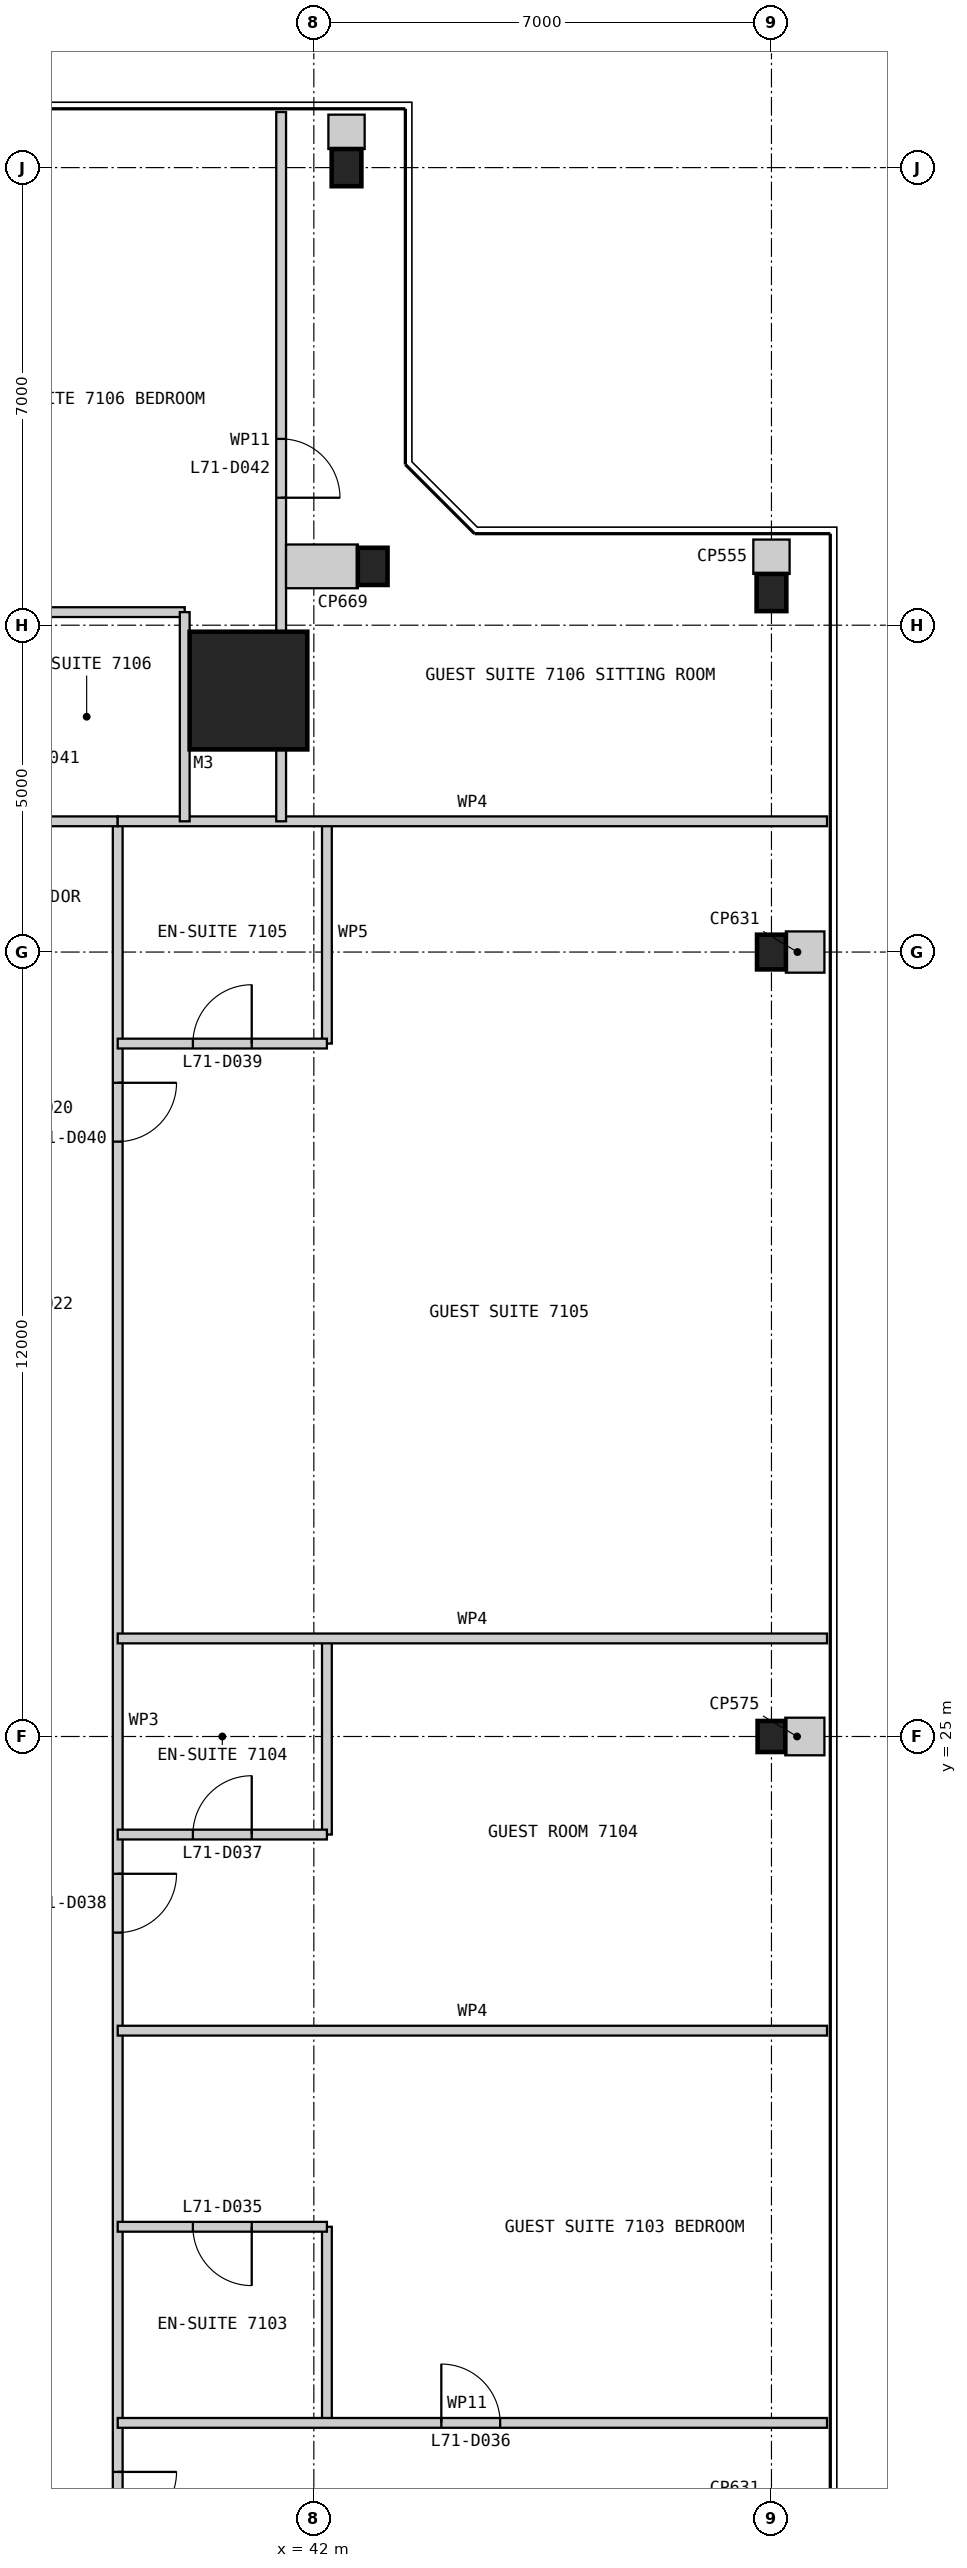
"""IFC4 building model, lengths in metres.
Left out: names, types, materials, properties, quantities, classifications, styles, units other than length and angle.
Written with IfcOpenShell. Run it as: python <this file> out.ifc"""

import sys

from ifc_helpers import new_model, si_unit, direction, frame, frame_2d, origin, origin_2d, place, context, subcontext, project, spatial, rectangle, i_section, extrude, element, fill, save


model = new_model("IFC4")
c1 = context("Model", 3, precision=1e-05, world=origin(), true_north=direction((0.0, 1.0)))
c2 = subcontext(c1, "Body", "Model", "MODEL_VIEW")
j1 = project(units=[si_unit("LENGTHUNIT", "METRE"), si_unit("PLANEANGLEUNIT", "RADIAN")], contexts=[c1])
p1 = place(None, origin())
s1 = spatial("IfcSite", under=j1, at=p1, CompositionType="ELEMENT")
p2 = place(p1, origin())
s2 = spatial("IfcBuilding", under=s1, at=p2, CompositionType="ELEMENT")
p3 = place(p2, frame((0.0, 0.0, 293.4)))
s3 = spatial("IfcBuildingStorey", under=s2, at=p3, CompositionType="ELEMENT", Elevation=293.4)
p4 = place(p3, frame((41.0, 41.0, 0.0), z_axis=(0.0, 0.0, 1.0), x_axis=(1.0, 0.0, 0.0)))
e1 = element("IfcColumn", 1, at=p4, inside=s3, PredefinedType="COLUMN", context=c2, shape_type="SweptSolid", body=[
    extrude(rectangle(XDim=1.8, YDim=1.8, at=origin_2d()), origin(), (0.0, 0.0, 1.0), 3.4),
])
p5 = place(p3, frame((49.0, 25.0, 0.0), z_axis=(0.0, 0.0, 1.0), x_axis=(1.0, 0.0, 0.0)))
e2 = element("IfcColumn", 2, at=p5, inside=s3, PredefinedType="COLUMN", context=c2, shape_type="SweptSolid", body=[
    extrude(i_section(OverallWidth=0.424, OverallDepth=0.475, WebThickness=0.048, FlangeThickness=0.077, at=origin_2d()), origin(), (0.0, 0.0, 1.0), 3.4),
])
p6 = place(p3, frame((49.0, 37.0, 0.0), z_axis=(0.0, 0.0, 1.0), x_axis=(1.0, 0.0, 0.0)))
e3 = element("IfcColumn", 3, at=p6, inside=s3, PredefinedType="COLUMN", context=c2, shape_type="SweptSolid", body=[
    extrude(i_section(OverallWidth=0.442, OverallDepth=0.531, WebThickness=0.066, FlangeThickness=0.106, at=origin_2d()), origin(), (0.0, 0.0, 1.0), 3.4),
])
for number, where, z_axis, x_axis in (
    (4, (49.0, 42.5, 0.0), (0.0, 0.0, 1.0), (1.0, 0.0, 0.0)),
    (5, (42.9, 42.9, 0.0), (0.0, 0.0, 1.0), (1.0, 0.0, 0.0)),
    (6, (42.5, 49.0, 0.0), (0.0, 0.0, 1.0), (1.0, 0.0, 0.0)),
):
    element("IfcColumn", number, at=place(p3, frame(where, z_axis=z_axis, x_axis=x_axis)), inside=s3, PredefinedType="COLUMN", context=c2, shape_type="SweptSolid", body=[
        extrude(i_section(OverallWidth=0.455, OverallDepth=0.569, WebThickness=0.078, FlangeThickness=0.125, at=origin_2d()), origin(), (0.0, 0.0, 1.0), 3.4),
    ])
p7 = place(p3, frame((39.0, 11.0, 0.0), z_axis=(0.0, 0.0, 1.0), x_axis=(0.0, 1.0, 0.0)))
e7 = element("IfcWall", 7, at=p7, inside=s3, PredefinedType="PARTITIONING", context=c2, shape_type="SweptSolid", body=[
    extrude(rectangle(XDim=28.0, YDim=0.15, at=frame_2d((14.0, 0.0))), origin(), (0.0, 0.0, 1.0), 2.794),
])
p8 = place(p7, frame((1.85, 0.0, 0.0)))
e8 = element("IfcOpeningElement", 8, at=p8, cuts=e7, PredefinedType="OPENING", context=c2, shape_type="SweptSolid", body=[
    extrude(rectangle(XDim=0.9, YDim=2.1, at=frame_2d((0.45, 1.05))), frame((0.0, 0.085, 0.0), z_axis=(0.0, -1.0, 0.0), x_axis=(1.0, 0.0, 0.0)), (0.0, 0.0, 1.0), 0.17),
])
p9 = place(p7, frame((11.0, 0.0, 0.0)))
e9 = element("IfcOpeningElement", 9, at=p9, cuts=e7, PredefinedType="OPENING", context=c2, shape_type="SweptSolid", body=[
    extrude(rectangle(XDim=0.9, YDim=2.1, at=frame_2d((0.45, 1.05))), frame((0.0, 0.085, 0.0), z_axis=(0.0, -1.0, 0.0), x_axis=(1.0, 0.0, 0.0)), (0.0, 0.0, 1.0), 0.17),
])
p10 = place(p7, frame((23.1, 0.0, 0.0)))
e10 = element("IfcOpeningElement", 10, at=p10, cuts=e7, PredefinedType="OPENING", context=c2, shape_type="SweptSolid", body=[
    extrude(rectangle(XDim=0.9, YDim=2.1, at=frame_2d((0.45, 1.05))), frame((0.0, 0.085, 0.0), z_axis=(0.0, -1.0, 0.0), x_axis=(1.0, 0.0, 0.0)), (0.0, 0.0, 1.0), 0.17),
])
p11 = place(p3, frame((42.2, 14.5, 0.0), z_axis=(0.0, 0.0, 1.0), x_axis=(0.0, 1.0, 0.0)))
e11 = element("IfcWall", 11, at=p11, inside=s3, PredefinedType="PARTITIONING", context=c2, shape_type="SweptSolid", body=[
    extrude(rectangle(XDim=3.0, YDim=0.15, at=frame_2d((1.5, 0.0))), origin(), (0.0, 0.0, 1.0), 3.2),
])
p12 = place(p3, frame((42.2, 17.5, 0.0), z_axis=(0.0, 0.0, 1.0), x_axis=(-1.0, 0.0, 0.0)))
e12 = element("IfcWall", 12, at=p12, inside=s3, PredefinedType="PARTITIONING", context=c2, shape_type="SweptSolid", body=[
    extrude(rectangle(XDim=3.2, YDim=0.15, at=frame_2d((1.6, 0.0))), origin(), (0.0, 0.0, 1.0), 3.2),
])
p13 = place(p12, frame((1.15, 0.0, 0.0)))
e13 = element("IfcOpeningElement", 13, at=p13, cuts=e12, PredefinedType="OPENING", context=c2, shape_type="SweptSolid", body=[
    extrude(rectangle(XDim=0.9, YDim=2.1, at=frame_2d((0.45, 1.05))), frame((0.0, 0.085, 0.0), z_axis=(0.0, -1.0, 0.0), x_axis=(1.0, 0.0, 0.0)), (0.0, 0.0, 1.0), 0.17),
])
p14 = place(p3, frame((49.85, 14.5, 0.0), z_axis=(0.0, 0.0, 1.0), x_axis=(-1.0, 0.0, 0.0)))
e14 = element("IfcWall", 14, at=p14, inside=s3, PredefinedType="PARTITIONING", context=c2, shape_type="SweptSolid", body=[
    extrude(rectangle(XDim=10.85, YDim=0.15, at=frame_2d((5.425, 0.0))), origin(), (0.0, 0.0, 1.0), 3.2),
])
p15 = place(p14, frame((5.0, 0.0, 0.0)))
e15 = element("IfcOpeningElement", 15, at=p15, cuts=e14, PredefinedType="OPENING", context=c2, shape_type="SweptSolid", body=[
    extrude(rectangle(XDim=0.9, YDim=2.1, at=frame_2d((0.45, 1.05))), frame((0.0, 0.085, 0.0), z_axis=(0.0, -1.0, 0.0), x_axis=(1.0, 0.0, 0.0)), (0.0, 0.0, 1.0), 0.17),
])
p16 = place(p3, frame((49.85, 20.5, 0.0), z_axis=(0.0, 0.0, 1.0), x_axis=(-1.0, 0.0, 0.0)))
e16 = element("IfcWall", 16, at=p16, inside=s3, PredefinedType="PARTITIONING", context=c2, shape_type="SweptSolid", body=[
    extrude(rectangle(XDim=10.85, YDim=0.15, at=frame_2d((5.425, 0.0))), origin(), (0.0, 0.0, 1.0), 3.2),
])
p17 = place(p3, frame((42.2, 23.5, 0.0), z_axis=(0.0, 0.0, 1.0), x_axis=(0.0, 1.0, 0.0)))
e17 = element("IfcWall", 17, at=p17, inside=s3, PredefinedType="PARTITIONING", context=c2, shape_type="SweptSolid", body=[
    extrude(rectangle(XDim=3.0, YDim=0.15, at=frame_2d((1.5, 0.0))), origin(), (0.0, 0.0, 1.0), 3.2),
])
p18 = place(p3, frame((42.2, 23.5, 0.0), z_axis=(0.0, 0.0, 1.0), x_axis=(-1.0, 0.0, 0.0)))
e18 = element("IfcWall", 18, at=p18, inside=s3, PredefinedType="PARTITIONING", context=c2, shape_type="SweptSolid", body=[
    extrude(rectangle(XDim=3.2, YDim=0.15, at=frame_2d((1.6, 0.0))), origin(), (0.0, 0.0, 1.0), 3.2),
])
p19 = place(p18, frame((1.15, 0.0, 0.0)))
e19 = element("IfcOpeningElement", 19, at=p19, cuts=e18, PredefinedType="OPENING", context=c2, shape_type="SweptSolid", body=[
    extrude(rectangle(XDim=0.9, YDim=2.1, at=frame_2d((0.45, 1.05))), frame((0.0, 0.085, 0.0), z_axis=(0.0, -1.0, 0.0), x_axis=(1.0, 0.0, 0.0)), (0.0, 0.0, 1.0), 0.17),
])
p20 = place(p3, frame((49.85, 26.5, 0.0), z_axis=(0.0, 0.0, 1.0), x_axis=(-1.0, 0.0, 0.0)))
e20 = element("IfcWall", 20, at=p20, inside=s3, PredefinedType="PARTITIONING", context=c2, shape_type="SweptSolid", body=[
    extrude(rectangle(XDim=10.85, YDim=0.15, at=frame_2d((5.425, 0.0))), origin(), (0.0, 0.0, 1.0), 3.2),
])
p21 = place(p3, frame((42.2, 35.6, 0.0), z_axis=(0.0, 0.0, 1.0), x_axis=(0.0, 1.0, 0.0)))
e21 = element("IfcWall", 21, at=p21, inside=s3, PredefinedType="PARTITIONING", context=c2, shape_type="SweptSolid", body=[
    extrude(rectangle(XDim=3.4, YDim=0.15, at=frame_2d((1.7, 0.0))), origin(), (0.0, 0.0, 1.0), 3.2),
])
p22 = place(p3, frame((42.2, 35.6, 0.0), z_axis=(0.0, 0.0, 1.0), x_axis=(-1.0, 0.0, 0.0)))
e22 = element("IfcWall", 22, at=p22, inside=s3, PredefinedType="PARTITIONING", context=c2, shape_type="SweptSolid", body=[
    extrude(rectangle(XDim=3.2, YDim=0.15, at=frame_2d((1.6, 0.0))), origin(), (0.0, 0.0, 1.0), 3.2),
])
p23 = place(p22, frame((1.15, 0.0, 0.0)))
e23 = element("IfcOpeningElement", 23, at=p23, cuts=e22, PredefinedType="OPENING", context=c2, shape_type="SweptSolid", body=[
    extrude(rectangle(XDim=0.9, YDim=2.1, at=frame_2d((0.45, 1.05))), frame((0.0, 0.085, 0.0), z_axis=(0.0, -1.0, 0.0), x_axis=(1.0, 0.0, 0.0)), (0.0, 0.0, 1.0), 0.17),
])
p24 = place(p3, frame((39.0, 39.0, 0.0), z_axis=(0.0, 0.0, 1.0), x_axis=(-1.0, 0.0, 0.0)))
e24 = element("IfcWall", 24, at=p24, inside=s3, PredefinedType="PARTITIONING", context=c2, shape_type="SweptSolid", body=[
    extrude(rectangle(XDim=28.0, YDim=0.15, at=frame_2d((14.0, 0.0))), origin(), (0.0, 0.0, 1.0), 2.794),
])
p25 = place(p24, frame((2.275, 0.0, 0.0)))
e25 = element("IfcOpeningElement", 25, at=p25, cuts=e24, PredefinedType="OPENING", context=c2, shape_type="SweptSolid", body=[
    extrude(rectangle(XDim=0.9, YDim=2.1, at=frame_2d((0.45, 1.05))), frame((0.0, 0.085, 0.0), z_axis=(0.0, -1.0, 0.0), x_axis=(1.0, 0.0, 0.0)), (0.0, 0.0, 1.0), 0.17),
])
p26 = place(p24, frame((10.6, 0.0, 0.0)))
e26 = element("IfcOpeningElement", 26, at=p26, cuts=e24, PredefinedType="OPENING", context=c2, shape_type="SweptSolid", body=[
    extrude(rectangle(XDim=0.9, YDim=2.1, at=frame_2d((0.45, 1.05))), frame((0.0, 0.085, 0.0), z_axis=(0.0, -1.0, 0.0), x_axis=(1.0, 0.0, 0.0)), (0.0, 0.0, 1.0), 0.17),
])
p27 = place(p24, frame((17.0, 0.0, 0.0)))
e27 = element("IfcOpeningElement", 27, at=p27, cuts=e24, PredefinedType="OPENING", context=c2, shape_type="SweptSolid", body=[
    extrude(rectangle(XDim=0.9, YDim=2.1, at=frame_2d((0.45, 1.05))), frame((0.0, 0.085, 0.0), z_axis=(0.0, -1.0, 0.0), x_axis=(1.0, 0.0, 0.0)), (0.0, 0.0, 1.0), 0.17),
])
p28 = place(p24, frame((23.2, 0.0, 0.0)))
e28 = element("IfcOpeningElement", 28, at=p28, cuts=e24, PredefinedType="OPENING", context=c2, shape_type="SweptSolid", body=[
    extrude(rectangle(XDim=1.0, YDim=2.1, at=frame_2d((0.5, 1.05))), frame((0.0, 0.085, 0.0), z_axis=(0.0, -1.0, 0.0), x_axis=(1.0, 0.0, 0.0)), (0.0, 0.0, 1.0), 0.17),
])
p29 = place(p3, frame((49.85, 39.0, 0.0), z_axis=(0.0, 0.0, 1.0), x_axis=(-1.0, 0.0, 0.0)))
e29 = element("IfcWall", 29, at=p29, inside=s3, PredefinedType="PARTITIONING", context=c2, shape_type="SweptSolid", body=[
    extrude(rectangle(XDim=10.85, YDim=0.15, at=frame_2d((5.425, 0.0))), origin(), (0.0, 0.0, 1.0), 2.794),
])
p30 = place(p3, frame((40.025, 42.2, 0.0), z_axis=(0.0, 0.0, 1.0), x_axis=(-1.0, 0.0, 0.0)))
e30 = element("IfcWall", 30, at=p30, inside=s3, PredefinedType="PARTITIONING", context=c2, shape_type="SweptSolid", body=[
    extrude(rectangle(XDim=3.0, YDim=0.15, at=frame_2d((1.5, 0.0))), origin(), (0.0, 0.0, 1.0), 3.2),
])
p31 = place(p3, frame((40.025, 42.2, 0.0), z_axis=(0.0, 0.0, 1.0), x_axis=(0.0, -1.0, 0.0)))
e31 = element("IfcWall", 31, at=p31, inside=s3, PredefinedType="PARTITIONING", context=c2, shape_type="SweptSolid", body=[
    extrude(rectangle(XDim=3.2, YDim=0.15, at=frame_2d((1.6, 0.0))), origin(), (0.0, 0.0, 1.0), 3.2),
])
p32 = place(p3, frame((41.5, 49.85, 0.0), z_axis=(0.0, 0.0, 1.0), x_axis=(0.0, -1.0, 0.0)))
e32 = element("IfcWall", 32, at=p32, inside=s3, PredefinedType="PARTITIONING", context=c2, shape_type="SweptSolid", body=[
    extrude(rectangle(XDim=10.85, YDim=0.15, at=frame_2d((5.425, 0.0))), origin(), (0.0, 0.0, 1.0), 3.2),
])
p33 = place(p32, frame((5.0, 0.0, 0.0)))
e33 = element("IfcOpeningElement", 33, at=p33, cuts=e32, PredefinedType="OPENING", context=c2, shape_type="SweptSolid", body=[
    extrude(rectangle(XDim=0.9, YDim=2.1, at=frame_2d((0.45, 1.05))), frame((0.0, 0.085, 0.0), z_axis=(0.0, -1.0, 0.0), x_axis=(1.0, 0.0, 0.0)), (0.0, 0.0, 1.0), 0.17),
])
p34 = place(p3, frame((49.81, 25.0, 0.0), z_axis=(0.0, 0.0, 1.0), x_axis=(-1.0, 0.0, 0.0)))
e34 = element("IfcWall", 34, at=p34, inside=s3, PredefinedType="PARTITIONING", context=c2, shape_type="SweptSolid", body=[
    extrude(rectangle(XDim=0.598, YDim=0.575, at=frame_2d((0.299, 0.0))), origin(), (0.0, 0.0, 1.0), 3.2),
])
p35 = place(p3, frame((49.81, 37.0, 0.0), z_axis=(0.0, 0.0, 1.0), x_axis=(-1.0, 0.0, 0.0)))
e35 = element("IfcWall", 35, at=p35, inside=s3, PredefinedType="PARTITIONING", context=c2, shape_type="SweptSolid", body=[
    extrude(rectangle(XDim=0.589, YDim=0.631, at=frame_2d((0.294, 0.0))), origin(), (0.0, 0.0, 1.0), 3.2),
])
p36 = place(p3, frame((49.0, 43.31, 0.0), z_axis=(0.0, 0.0, 1.0), x_axis=(0.0, -1.0, 0.0)))
e36 = element("IfcWall", 36, at=p36, inside=s3, PredefinedType="PARTITIONING", context=c2, shape_type="SweptSolid", body=[
    extrude(rectangle(XDim=0.526, YDim=0.555, at=frame_2d((0.263, 0.0))), origin(), (0.0, 0.0, 1.0), 3.2),
])
p37 = place(p3, frame((41.575, 42.9, 0.0), z_axis=(0.0, 0.0, 1.0), x_axis=(1.0, 0.0, 0.0)))
e37 = element("IfcWall", 37, at=p37, inside=s3, PredefinedType="PARTITIONING", context=c2, shape_type="SweptSolid", body=[
    extrude(rectangle(XDim=1.098, YDim=0.669, at=frame_2d((0.549, 0.0))), origin(), (0.0, 0.0, 1.0), 3.2),
])
p38 = place(p3, frame((42.5, 49.81, 0.0), z_axis=(0.0, 0.0, 1.0), x_axis=(0.0, -1.0, 0.0)))
e38 = element("IfcWall", 38, at=p38, inside=s3, PredefinedType="PARTITIONING", context=c2, shape_type="SweptSolid", body=[
    extrude(rectangle(XDim=0.526, YDim=0.555, at=frame_2d((0.263, 0.0))), origin(), (0.0, 0.0, 1.0), 3.2),
])
p39 = place(p8, frame((0.9, 0.0, 0.0), z_axis=(0.0, 0.0, 1.0), x_axis=(-1.0, 0.0, 0.0)))
e39 = element("IfcDoor", 39, at=p39, inside=s3, OperationType="SINGLE_SWING_LEFT", PredefinedType="DOOR", context=c2, shape_type="SweptSolid", body=[
    extrude(rectangle(XDim=0.9, YDim=2.1, at=frame_2d((0.45, 1.05))), frame((0.0, 0.025, 0.0), z_axis=(0.0, -1.0, 0.0), x_axis=(1.0, 0.0, 0.0)), (0.0, 0.0, 1.0), 0.05),
])
fill(e8, e39)
p40 = place(p13, origin())
e40 = element("IfcDoor", 40, at=p40, inside=s3, OperationType="SINGLE_SWING_LEFT", PredefinedType="DOOR", context=c2, shape_type="SweptSolid", body=[
    extrude(rectangle(XDim=0.9, YDim=2.1, at=frame_2d((0.45, 1.05))), frame((0.0, 0.025, 0.0), z_axis=(0.0, -1.0, 0.0), x_axis=(1.0, 0.0, 0.0)), (0.0, 0.0, 1.0), 0.05),
])
fill(e13, e40)
p41 = place(p15, frame((0.9, 0.0, 0.0), z_axis=(0.0, 0.0, 1.0), x_axis=(-1.0, 0.0, 0.0)))
e41 = element("IfcDoor", 41, at=p41, inside=s3, OperationType="SINGLE_SWING_LEFT", PredefinedType="DOOR", context=c2, shape_type="SweptSolid", body=[
    extrude(rectangle(XDim=0.9, YDim=2.1, at=frame_2d((0.45, 1.05))), frame((0.0, 0.025, 0.0), z_axis=(0.0, -1.0, 0.0), x_axis=(1.0, 0.0, 0.0)), (0.0, 0.0, 1.0), 0.05),
])
fill(e15, e41)
p42 = place(p19, frame((0.9, 0.0, 0.0), z_axis=(0.0, 0.0, 1.0), x_axis=(-1.0, 0.0, 0.0)))
e42 = element("IfcDoor", 42, at=p42, inside=s3, OperationType="SINGLE_SWING_RIGHT", PredefinedType="DOOR", context=c2, shape_type="SweptSolid", body=[
    extrude(rectangle(XDim=0.9, YDim=2.1, at=frame_2d((0.45, 1.05))), frame((0.0, 0.025, 0.0), z_axis=(0.0, -1.0, 0.0), x_axis=(1.0, 0.0, 0.0)), (0.0, 0.0, 1.0), 0.05),
])
fill(e19, e42)
p43 = place(p9, frame((0.9, 0.0, 0.0), z_axis=(0.0, 0.0, 1.0), x_axis=(-1.0, 0.0, 0.0)))
e43 = element("IfcDoor", 43, at=p43, inside=s3, OperationType="SINGLE_SWING_LEFT", PredefinedType="DOOR", context=c2, shape_type="SweptSolid", body=[
    extrude(rectangle(XDim=0.9, YDim=2.1, at=frame_2d((0.45, 1.05))), frame((0.0, 0.025, 0.0), z_axis=(0.0, -1.0, 0.0), x_axis=(1.0, 0.0, 0.0)), (0.0, 0.0, 1.0), 0.05),
])
fill(e9, e43)
p44 = place(p23, frame((0.9, 0.0, 0.0), z_axis=(0.0, 0.0, 1.0), x_axis=(-1.0, 0.0, 0.0)))
e44 = element("IfcDoor", 44, at=p44, inside=s3, OperationType="SINGLE_SWING_RIGHT", PredefinedType="DOOR", context=c2, shape_type="SweptSolid", body=[
    extrude(rectangle(XDim=0.9, YDim=2.1, at=frame_2d((0.45, 1.05))), frame((0.0, 0.025, 0.0), z_axis=(0.0, -1.0, 0.0), x_axis=(1.0, 0.0, 0.0)), (0.0, 0.0, 1.0), 0.05),
])
fill(e23, e44)
p45 = place(p10, frame((0.9, 0.0, 0.0), z_axis=(0.0, 0.0, 1.0), x_axis=(-1.0, 0.0, 0.0)))
e45 = element("IfcDoor", 45, at=p45, inside=s3, OperationType="SINGLE_SWING_LEFT", PredefinedType="DOOR", context=c2, shape_type="SweptSolid", body=[
    extrude(rectangle(XDim=0.9, YDim=2.1, at=frame_2d((0.45, 1.05))), frame((0.0, 0.025, 0.0), z_axis=(0.0, -1.0, 0.0), x_axis=(1.0, 0.0, 0.0)), (0.0, 0.0, 1.0), 0.05),
])
fill(e10, e45)
p46 = place(p33, origin())
e46 = element("IfcDoor", 46, at=p46, inside=s3, OperationType="SINGLE_SWING_RIGHT", PredefinedType="DOOR", context=c2, shape_type="SweptSolid", body=[
    extrude(rectangle(XDim=0.9, YDim=2.1, at=frame_2d((0.45, 1.05))), frame((0.0, 0.025, 0.0), z_axis=(0.0, -1.0, 0.0), x_axis=(1.0, 0.0, 0.0)), (0.0, 0.0, 1.0), 0.05),
])
fill(e33, e46)
save(model, sys.argv[1])
